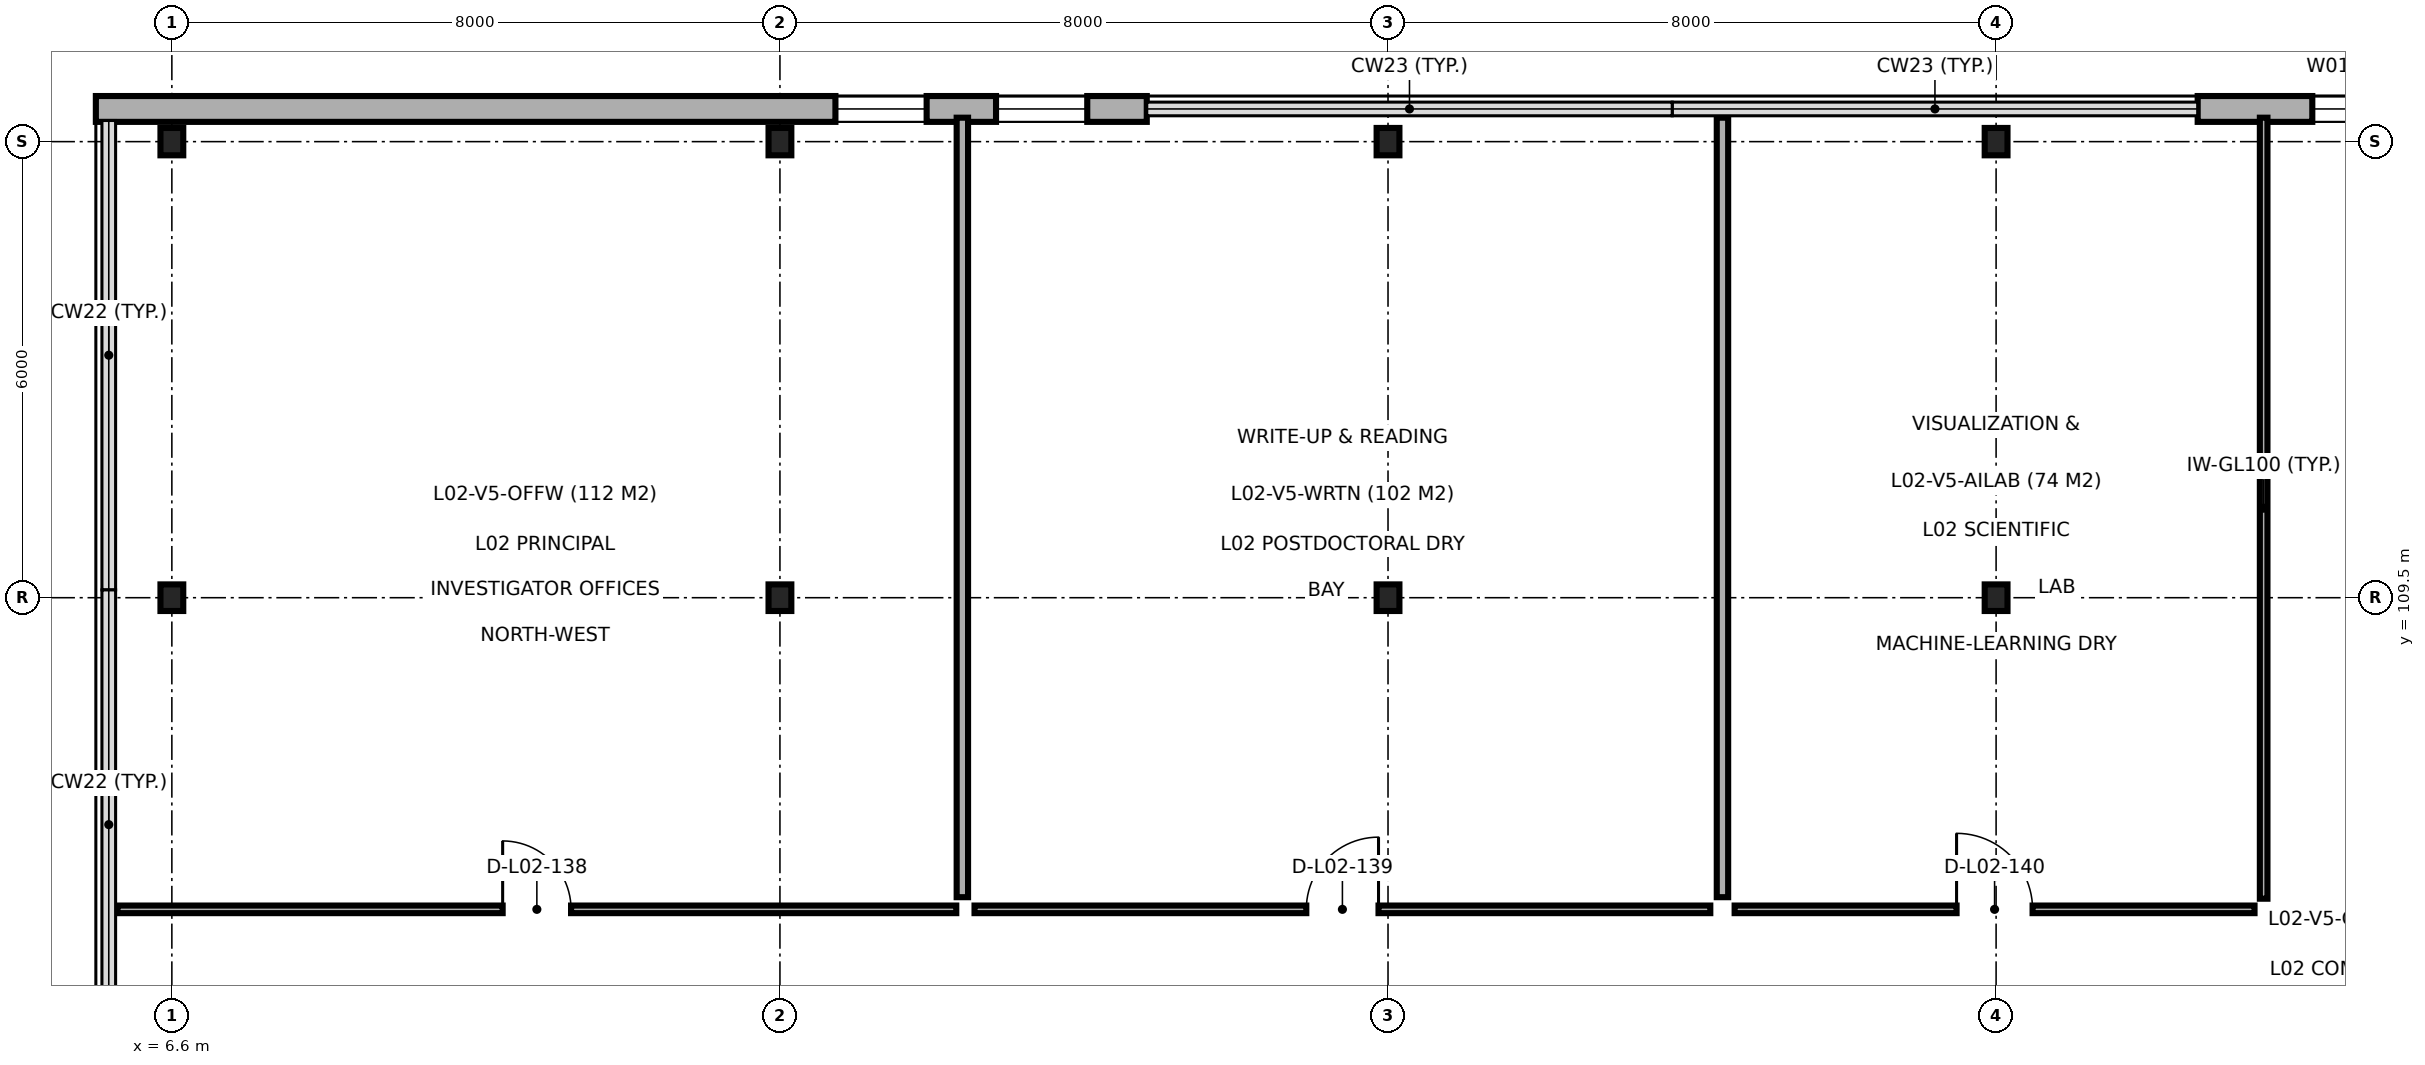
"""IFC4 building model, lengths in metres.
Left out: names, types, materials, properties, quantities, classifications, styles, units other than length and angle.
Written with IfcOpenShell. Run it as: python <this file> out.ifc"""

import sys

from ifc_helpers import new_model, si_unit, direction, frame, frame_2d, origin, origin_2d, place, context, subcontext, project, spatial, rectangle, i_section, extrude, element, fill, save


model = new_model("IFC4")
c1 = context("Model", 3, precision=1e-05, world=origin(), true_north=direction((0.0, 1.0)))
c2 = subcontext(c1, "Body", "Model", "MODEL_VIEW")
j1 = project(units=[si_unit("LENGTHUNIT", "METRE"), si_unit("PLANEANGLEUNIT", "RADIAN")], contexts=[c1])
p1 = place(None, origin())
s1 = spatial("IfcSite", under=j1, at=p1, CompositionType="ELEMENT")
p2 = place(p1, origin())
s2 = spatial("IfcBuilding", under=s1, at=p2, CompositionType="ELEMENT")
p3 = place(p2, frame((0.0, 0.0, 9.3)))
s3 = spatial("IfcBuildingStorey", under=s2, at=p3, CompositionType="ELEMENT", Elevation=9.3)
p4 = place(p3, frame((6.6, 109.5, 0.0), z_axis=(0.0, 0.0, 1.0), x_axis=(1.0, 0.0, 0.0)))
e1 = element("IfcColumn", 1, at=p4, inside=s3, PredefinedType="COLUMN", context=c2, shape_type="SweptSolid", body=[
    extrude(i_section(OverallWidth=0.3, OverallDepth=0.35, WebThickness=0.01, FlangeThickness=0.018, FilletRadius=0.027, at=origin_2d()), origin(), (0.0, 0.0, 1.0), 4.5),
])
p5 = place(p3, frame((6.6, 115.5, 0.0), z_axis=(0.0, 0.0, 1.0), x_axis=(1.0, 0.0, 0.0)))
e2 = element("IfcColumn", 2, at=p5, inside=s3, PredefinedType="COLUMN", context=c2, shape_type="SweptSolid", body=[
    extrude(i_section(OverallWidth=0.3, OverallDepth=0.36, WebThickness=0.012, FlangeThickness=0.022, FilletRadius=0.027, at=origin_2d()), origin(), (0.0, 0.0, 1.0), 4.5),
])
p6 = place(p3, frame((14.6, 109.5, 0.0), z_axis=(0.0, 0.0, 1.0), x_axis=(1.0, 0.0, 0.0)))
e3 = element("IfcColumn", 3, at=p6, inside=s3, PredefinedType="COLUMN", context=c2, shape_type="SweptSolid", body=[
    extrude(i_section(OverallWidth=0.3, OverallDepth=0.35, WebThickness=0.01, FlangeThickness=0.018, FilletRadius=0.027, at=origin_2d()), origin(), (0.0, 0.0, 1.0), 4.5),
])
p7 = place(p3, frame((14.6, 115.5, 0.0), z_axis=(0.0, 0.0, 1.0), x_axis=(1.0, 0.0, 0.0)))
e4 = element("IfcColumn", 4, at=p7, inside=s3, PredefinedType="COLUMN", context=c2, shape_type="SweptSolid", body=[
    extrude(i_section(OverallWidth=0.3, OverallDepth=0.36, WebThickness=0.012, FlangeThickness=0.022, FilletRadius=0.027, at=origin_2d()), origin(), (0.0, 0.0, 1.0), 4.5),
])
p8 = place(p3, frame((22.6, 109.5, 0.0), z_axis=(0.0, 0.0, 1.0), x_axis=(1.0, 0.0, 0.0)))
e5 = element("IfcColumn", 5, at=p8, inside=s3, PredefinedType="COLUMN", context=c2, shape_type="SweptSolid", body=[
    extrude(i_section(OverallWidth=0.3, OverallDepth=0.35, WebThickness=0.01, FlangeThickness=0.018, FilletRadius=0.027, at=origin_2d()), origin(), (0.0, 0.0, 1.0), 4.5),
])
p9 = place(p3, frame((22.6, 115.5, 0.0), z_axis=(0.0, 0.0, 1.0), x_axis=(1.0, 0.0, 0.0)))
e6 = element("IfcColumn", 6, at=p9, inside=s3, PredefinedType="COLUMN", context=c2, shape_type="SweptSolid", body=[
    extrude(i_section(OverallWidth=0.3, OverallDepth=0.36, WebThickness=0.012, FlangeThickness=0.022, FilletRadius=0.027, at=origin_2d()), origin(), (0.0, 0.0, 1.0), 4.5),
])
p10 = place(p3, frame((30.6, 109.5, 0.0), z_axis=(0.0, 0.0, 1.0), x_axis=(1.0, 0.0, 0.0)))
e7 = element("IfcColumn", 7, at=p10, inside=s3, PredefinedType="COLUMN", context=c2, shape_type="SweptSolid", body=[
    extrude(i_section(OverallWidth=0.3, OverallDepth=0.35, WebThickness=0.01, FlangeThickness=0.018, FilletRadius=0.027, at=origin_2d()), origin(), (0.0, 0.0, 1.0), 4.5),
])
p11 = place(p3, frame((30.6, 115.5, 0.0), z_axis=(0.0, 0.0, 1.0), x_axis=(1.0, 0.0, 0.0)))
e8 = element("IfcColumn", 8, at=p11, inside=s3, PredefinedType="COLUMN", context=c2, shape_type="SweptSolid", body=[
    extrude(i_section(OverallWidth=0.3, OverallDepth=0.36, WebThickness=0.012, FlangeThickness=0.022, FilletRadius=0.027, at=origin_2d()), origin(), (0.0, 0.0, 1.0), 4.5),
])
p12 = place(p3, frame((47.078, 115.93, 0.0), z_axis=(0.0, 0.0, 1.0), x_axis=(-1.0, 0.0, 0.0)))
e9 = element("IfcWall", 9, at=p12, inside=s3, PredefinedType="SOLIDWALL", context=c2, shape_type="SweptSolid", body=[
    extrude(rectangle(XDim=13.826, YDim=0.34, at=frame_2d((6.913, 0.0))), origin(), (0.0, 0.0, 1.0), 4.25),
])
p13 = place(p12, frame((9.158, 0.0, 0.9)))
e10 = element("IfcOpeningElement", 10, at=p13, cuts=e9, PredefinedType="OPENING", context=c2, shape_type="SweptSolid", body=[
    extrude(rectangle(XDim=0.9, YDim=1.8, at=frame_2d((0.45, 0.9))), frame((0.0, 0.18, 0.0), z_axis=(0.0, -1.0, 0.0), x_axis=(1.0, 0.0, 0.0)), (0.0, 0.0, 1.0), 0.36),
])
p14 = place(p12, frame((11.118, 0.0, 0.9)))
e11 = element("IfcOpeningElement", 11, at=p14, cuts=e9, PredefinedType="OPENING", context=c2, shape_type="SweptSolid", body=[
    extrude(rectangle(XDim=1.2, YDim=1.8, at=frame_2d((0.6, 0.9))), frame((0.0, 0.18, 0.0), z_axis=(0.0, -1.0, 0.0), x_axis=(1.0, 0.0, 0.0)), (0.0, 0.0, 1.0), 0.36),
])
p15 = place(p3, frame((19.426, 115.93, 0.0), z_axis=(0.0, 0.0, 1.0), x_axis=(-1.0, 0.0, 0.0)))
e12 = element("IfcWall", 12, at=p15, inside=s3, PredefinedType="SOLIDWALL", context=c2, shape_type="SweptSolid", body=[
    extrude(rectangle(XDim=13.826, YDim=0.34, at=frame_2d((6.913, 0.0))), origin(), (0.0, 0.0, 1.0), 4.25),
])
p16 = place(p15, frame((0.783, 0.0, 0.9)))
e13 = element("IfcOpeningElement", 13, at=p16, cuts=e12, PredefinedType="OPENING", context=c2, shape_type="SweptSolid", body=[
    extrude(rectangle(XDim=1.2, YDim=1.8, at=frame_2d((0.6, 0.9))), frame((0.0, 0.18, 0.0), z_axis=(0.0, -1.0, 0.0), x_axis=(1.0, 0.0, 0.0)), (0.0, 0.0, 1.0), 0.36),
])
p17 = place(p15, frame((2.896, 0.0, 0.9)))
e14 = element("IfcOpeningElement", 14, at=p17, cuts=e12, PredefinedType="OPENING", context=c2, shape_type="SweptSolid", body=[
    extrude(rectangle(XDim=1.2, YDim=1.8, at=frame_2d((0.6, 0.9))), frame((0.0, 0.18, 0.0), z_axis=(0.0, -1.0, 0.0), x_axis=(1.0, 0.0, 0.0)), (0.0, 0.0, 1.0), 0.36),
])
p18 = place(p3, frame((17.0, 105.56, 0.0), z_axis=(0.0, 0.0, 1.0), x_axis=(0.0, 1.0, 0.0)))
e15 = element("IfcWall", 15, at=p18, inside=s3, PredefinedType="PARTITIONING", context=c2, shape_type="SweptSolid", body=[
    extrude(rectangle(XDim=10.255, YDim=0.15, at=frame_2d((5.127, 0.0))), origin(), (0.0, 0.0, 1.0), 4.01),
])
p19 = place(p3, frame((27.0, 105.56, 0.0), z_axis=(0.0, 0.0, 1.0), x_axis=(0.0, 1.0, 0.0)))
e16 = element("IfcWall", 16, at=p19, inside=s3, PredefinedType="PARTITIONING", context=c2, shape_type="SweptSolid", body=[
    extrude(rectangle(XDim=10.255, YDim=0.15, at=frame_2d((5.127, 0.0))), origin(), (0.0, 0.0, 1.0), 4.25),
])
p20 = place(p3, frame((34.12, 105.54, 0.0), z_axis=(0.0, 0.0, 1.0), x_axis=(0.0, 1.0, 0.0)))
e17 = element("IfcWall", 17, at=p20, inside=s3, PredefinedType="PARTITIONING", context=c2, shape_type="SweptSolid", body=[
    extrude(rectangle(XDim=10.275, YDim=0.1, at=frame_2d((5.137, 0.0))), origin(), (0.0, 0.0, 1.0), 4.25),
])
p21 = place(p3, frame((5.885, 105.4, 0.0), z_axis=(0.0, 0.0, 1.0), x_axis=(1.0, 0.0, 0.0)))
e18 = element("IfcWall", 18, at=p21, inside=s3, PredefinedType="PARTITIONING", context=c2, shape_type="SweptSolid", body=[
    extrude(rectangle(XDim=11.035, YDim=0.1, at=frame_2d((5.518, 0.0))), origin(), (0.0, 0.0, 1.0), 4.25),
])
p22 = place(p21, frame((5.067, 0.0, 0.0)))
e19 = element("IfcOpeningElement", 19, at=p22, cuts=e18, PredefinedType="OPENING", context=c2, shape_type="SweptSolid", body=[
    extrude(rectangle(XDim=0.9, YDim=2.1, at=frame_2d((0.45, 1.05))), frame((0.0, 0.06, 0.0), z_axis=(0.0, -1.0, 0.0), x_axis=(1.0, 0.0, 0.0)), (0.0, 0.0, 1.0), 0.12),
])
p23 = place(p3, frame((17.16, 105.4, 0.0), z_axis=(0.0, 0.0, 1.0), x_axis=(1.0, 0.0, 0.0)))
e20 = element("IfcWall", 20, at=p23, inside=s3, PredefinedType="PARTITIONING", context=c2, shape_type="SweptSolid", body=[
    extrude(rectangle(XDim=9.68, YDim=0.1, at=frame_2d((4.84, 0.0))), origin(), (0.0, 0.0, 1.0), 4.25),
])
p24 = place(p23, frame((4.365, 0.0, 0.0)))
e21 = element("IfcOpeningElement", 21, at=p24, cuts=e20, PredefinedType="OPENING", context=c2, shape_type="SweptSolid", body=[
    extrude(rectangle(XDim=0.95, YDim=2.1, at=frame_2d((0.475, 1.05))), frame((0.0, 0.06, 0.0), z_axis=(0.0, -1.0, 0.0), x_axis=(1.0, 0.0, 0.0)), (0.0, 0.0, 1.0), 0.12),
])
p25 = place(p3, frame((27.16, 105.4, 0.0), z_axis=(0.0, 0.0, 1.0), x_axis=(1.0, 0.0, 0.0)))
e22 = element("IfcWall", 22, at=p25, inside=s3, PredefinedType="PARTITIONING", context=c2, shape_type="SweptSolid", body=[
    extrude(rectangle(XDim=6.84, YDim=0.1, at=frame_2d((3.42, 0.0))), origin(), (0.0, 0.0, 1.0), 4.25),
])
p26 = place(p25, frame((2.92, 0.0, 0.0)))
e23 = element("IfcOpeningElement", 23, at=p26, cuts=e22, PredefinedType="OPENING", context=c2, shape_type="SweptSolid", body=[
    extrude(rectangle(XDim=1.0, YDim=2.15, at=frame_2d((0.5, 1.075))), frame((0.0, 0.06, 0.0), z_axis=(0.0, -1.0, 0.0), x_axis=(1.0, 0.0, 0.0)), (0.0, 0.0, 1.0), 0.12),
])
p27 = place(p14, origin())
e24 = element("IfcWindow", 24, at=p27, inside=s3, PartitioningType="SINGLE_PANEL", PredefinedType="WINDOW", context=c2, shape_type="SweptSolid", body=[
    extrude(rectangle(XDim=1.2, YDim=1.8, at=frame_2d((0.6, 0.9))), frame((0.0, 0.03, 0.0), z_axis=(0.0, -1.0, 0.0), x_axis=(1.0, 0.0, 0.0)), (0.0, 0.0, 1.0), 0.06),
])
fill(e11, e24)
p28 = place(p16, origin())
e25 = element("IfcWindow", 25, at=p28, inside=s3, PartitioningType="SINGLE_PANEL", PredefinedType="WINDOW", context=c2, shape_type="SweptSolid", body=[
    extrude(rectangle(XDim=1.2, YDim=1.8, at=frame_2d((0.6, 0.9))), frame((0.0, 0.03, 0.0), z_axis=(0.0, -1.0, 0.0), x_axis=(1.0, 0.0, 0.0)), (0.0, 0.0, 1.0), 0.06),
])
fill(e13, e25)
p29 = place(p17, origin())
e26 = element("IfcWindow", 26, at=p29, inside=s3, PartitioningType="SINGLE_PANEL", PredefinedType="WINDOW", context=c2, shape_type="SweptSolid", body=[
    extrude(rectangle(XDim=1.2, YDim=1.8, at=frame_2d((0.6, 0.9))), frame((0.0, 0.03, 0.0), z_axis=(0.0, -1.0, 0.0), x_axis=(1.0, 0.0, 0.0)), (0.0, 0.0, 1.0), 0.06),
])
fill(e14, e26)
p30 = place(p22, origin())
e27 = element("IfcDoor", 27, at=p30, inside=s3, OperationType="SINGLE_SWING_LEFT", PredefinedType="DOOR", context=c2, shape_type="SweptSolid", body=[
    extrude(rectangle(XDim=0.9, YDim=2.1, at=frame_2d((0.45, 1.05))), frame((0.0, 0.025, 0.0), z_axis=(0.0, -1.0, 0.0), x_axis=(1.0, 0.0, 0.0)), (0.0, 0.0, 1.0), 0.05),
])
fill(e19, e27)
p31 = place(p24, origin())
e28 = element("IfcDoor", 28, at=p31, inside=s3, OperationType="SINGLE_SWING_RIGHT", PredefinedType="DOOR", context=c2, shape_type="SweptSolid", body=[
    extrude(rectangle(XDim=0.95, YDim=2.1, at=frame_2d((0.475, 1.05))), frame((0.0, 0.025, 0.0), z_axis=(0.0, -1.0, 0.0), x_axis=(1.0, 0.0, 0.0)), (0.0, 0.0, 1.0), 0.05),
])
fill(e21, e28)
p32 = place(p26, origin())
e29 = element("IfcDoor", 29, at=p32, inside=s3, OperationType="SINGLE_SWING_LEFT", PredefinedType="DOOR", context=c2, shape_type="SweptSolid", body=[
    extrude(rectangle(XDim=1.0, YDim=2.15, at=frame_2d((0.5, 1.075))), frame((0.0, 0.025, 0.0), z_axis=(0.0, -1.0, 0.0), x_axis=(1.0, 0.0, 0.0)), (0.0, 0.0, 1.0), 0.05),
])
fill(e23, e29)
save(model, sys.argv[1])
